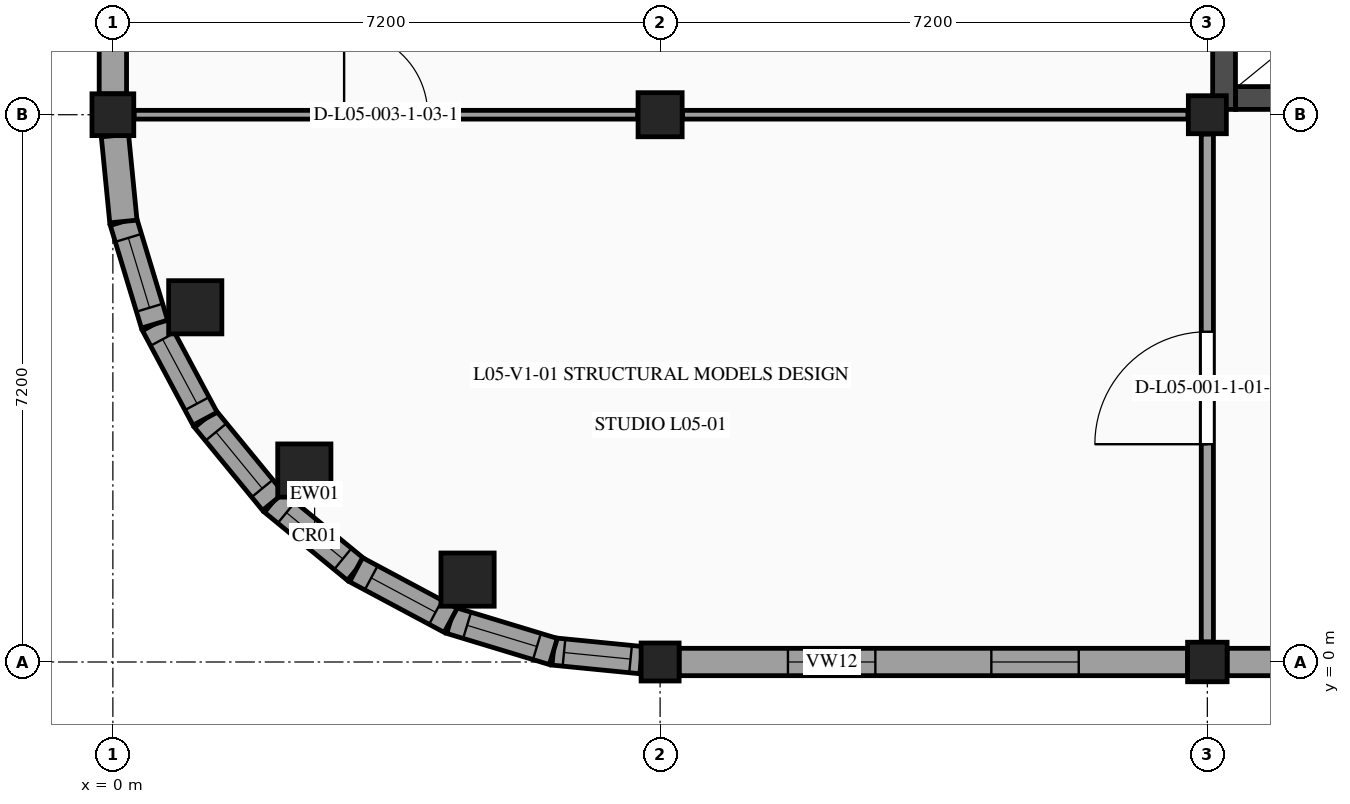
"""IFC4 building model, lengths in metres.
Left out: names, types, materials, properties, quantities, classifications, styles, units other than length and angle.
Written with IfcOpenShell. Run it as: python <this file> out.ifc"""

import sys

from ifc_helpers import new_model, si_unit, direction, frame, frame_2d, origin, origin_2d, place, context, subcontext, project, spatial, rectangle, circle, extrude, element, fill, save


model = new_model("IFC4")
c1 = context("Model", 3, precision=1e-05, world=origin(), true_north=direction((0.0, 1.0)))
c2 = subcontext(c1, "Body", "Model", "MODEL_VIEW")
j1 = project(units=[si_unit("LENGTHUNIT", "METRE"), si_unit("PLANEANGLEUNIT", "RADIAN")], contexts=[c1])
p1 = place(None, origin())
s1 = spatial("IfcSite", under=j1, at=p1, CompositionType="ELEMENT")
p2 = place(p1, origin())
s2 = spatial("IfcBuilding", under=s1, at=p2, CompositionType="ELEMENT")
p3 = place(p2, frame((0.0, 0.0, 22.8)))
s3 = spatial("IfcBuildingStorey", under=s2, at=p3, CompositionType="ELEMENT", Elevation=22.8)
p4 = place(p3, frame((0.0, 7.2, 0.0), z_axis=(0.0, 0.0, 1.0), x_axis=(1.0, 0.0, 0.0)))
e1 = element("IfcColumn", 1, at=p4, inside=s3, PredefinedType="COLUMN", context=c2, shape_type="SweptSolid", body=[
    extrude(rectangle(XDim=0.55, YDim=0.55, at=origin_2d()), origin(), (0.0, 0.0, 1.0), 3.9),
])
p5 = place(p3, frame((7.2, 0.0, 0.0), z_axis=(0.0, 0.0, 1.0), x_axis=(1.0, 0.0, 0.0)))
e2 = element("IfcColumn", 2, at=p5, inside=s3, PredefinedType="COLUMN", context=c2, shape_type="SweptSolid", body=[
    extrude(rectangle(XDim=0.5, YDim=0.5, at=origin_2d()), origin(), (0.0, 0.0, 1.0), 3.9),
])
p6 = place(p3, frame((7.2, 7.2, 0.0), z_axis=(0.0, 0.0, 1.0), x_axis=(1.0, 0.0, 0.0)))
e3 = element("IfcColumn", 3, at=p6, inside=s3, PredefinedType="COLUMN", context=c2, shape_type="SweptSolid", body=[
    extrude(rectangle(XDim=0.58, YDim=0.58, at=origin_2d()), origin(), (0.0, 0.0, 1.0), 3.9),
])
p7 = place(p3, frame((14.4, 0.0, 0.0), z_axis=(0.0, 0.0, 1.0), x_axis=(1.0, 0.0, 0.0)))
e4 = element("IfcColumn", 4, at=p7, inside=s3, PredefinedType="COLUMN", context=c2, shape_type="SweptSolid", body=[
    extrude(rectangle(XDim=0.52, YDim=0.52, at=origin_2d()), origin(), (0.0, 0.0, 1.0), 3.9),
])
p8 = place(p3, frame((14.4, 7.2, 0.0), z_axis=(0.0, 0.0, 1.0), x_axis=(1.0, 0.0, 0.0)))
e5 = element("IfcColumn", 5, at=p8, inside=s3, PredefinedType="COLUMN", context=c2, shape_type="SweptSolid", body=[
    extrude(rectangle(XDim=0.5, YDim=0.5, at=origin_2d()), origin(), (0.0, 0.0, 1.0), 3.9),
])
for number, where, z_axis, x_axis in (
    (6, (1.084, 4.667, 0.0), (0.0, 0.0, 1.0), (1.0, 0.0, 0.0)),
    (7, (2.519, 2.519, 0.0), (0.0, 0.0, 1.0), (1.0, 0.0, 0.0)),
    (8, (4.667, 1.084, 0.0), (0.0, 0.0, 1.0), (1.0, 0.0, 0.0)),
):
    element("IfcColumn", number, at=place(p3, frame(where, z_axis=z_axis, x_axis=x_axis)), inside=s3, PredefinedType="COLUMN", context=c2, shape_type="SweptSolid", body=[
        extrude(circle(Radius=0.35, at=origin_2d()), origin(), (0.0, 0.0, 1.0), 3.9),
    ])
p9 = place(p3, frame((3.2, 1.213, 0.0), z_axis=(0.0, 0.0, 1.0), x_axis=(-0.772977670605, 0.634433227965, 0.0)))
e9 = element("IfcWall", 9, at=p9, inside=s3, PredefinedType="STANDARD", context=c2, shape_type="SweptSolid", body=[
    extrude(rectangle(XDim=1.412, YDim=0.36, at=frame_2d((0.706, 0.0))), origin(), (0.0, 0.0, 1.0), 3.67),
])
p10 = place(p9, frame((0.226, 0.0, 1.0)))
e10 = element("IfcOpeningElement", 10, at=p10, cuts=e9, PredefinedType="OPENING", context=c2, shape_type="SweptSolid", body=[
    extrude(rectangle(XDim=0.96, YDim=1.4, at=frame_2d((0.48, 0.7))), frame((0.0, 0.19, 0.0), z_axis=(0.0, -1.0, 0.0), x_axis=(1.0, 0.0, 0.0)), (0.0, 0.0, 1.0), 0.38),
])
p11 = place(p3, frame((2.109, 2.109, 0.0), z_axis=(0.0, 0.0, 1.0), x_axis=(-0.634433227965, 0.772977670605, 0.0)))
e11 = element("IfcWall", 11, at=p11, inside=s3, PredefinedType="STANDARD", context=c2, shape_type="SweptSolid", body=[
    extrude(rectangle(XDim=1.412, YDim=0.36, at=frame_2d((0.706, 0.0))), origin(), (0.0, 0.0, 1.0), 3.67),
])
p12 = place(p11, frame((0.226, 0.0, 1.0)))
e12 = element("IfcOpeningElement", 12, at=p12, cuts=e11, PredefinedType="OPENING", context=c2, shape_type="SweptSolid", body=[
    extrude(rectangle(XDim=0.96, YDim=1.4, at=frame_2d((0.48, 0.7))), frame((0.0, 0.19, 0.0), z_axis=(0.0, -1.0, 0.0), x_axis=(1.0, 0.0, 0.0)), (0.0, 0.0, 1.0), 0.38),
])
p13 = place(p3, frame((1.213, 3.2, 0.0), z_axis=(0.0, 0.0, 1.0), x_axis=(-0.471405109778, 0.881916788861, 0.0)))
e13 = element("IfcWall", 13, at=p13, inside=s3, PredefinedType="STANDARD", context=c2, shape_type="SweptSolid", body=[
    extrude(rectangle(XDim=1.411, YDim=0.36, at=frame_2d((0.706, 0.0))), origin(), (0.0, 0.0, 1.0), 3.67),
])
p14 = place(p13, frame((0.226, 0.0, 1.0)))
e14 = element("IfcOpeningElement", 14, at=p14, cuts=e13, PredefinedType="OPENING", context=c2, shape_type="SweptSolid", body=[
    extrude(rectangle(XDim=0.96, YDim=1.4, at=frame_2d((0.48, 0.7))), frame((0.0, 0.19, 0.0), z_axis=(0.0, -1.0, 0.0), x_axis=(1.0, 0.0, 0.0)), (0.0, 0.0, 1.0), 0.38),
])
p15 = place(p3, frame((0.548, 4.445, 0.0), z_axis=(0.0, 0.0, 1.0), x_axis=(-0.290218599957, 0.95696037757, 0.0)))
e15 = element("IfcWall", 15, at=p15, inside=s3, PredefinedType="STANDARD", context=c2, shape_type="SweptSolid", body=[
    extrude(rectangle(XDim=1.412, YDim=0.36, at=frame_2d((0.706, 0.0))), origin(), (0.0, 0.0, 1.0), 3.67),
])
p16 = place(p15, frame((0.226, 0.0, 1.0)))
e16 = element("IfcOpeningElement", 16, at=p16, cuts=e15, PredefinedType="OPENING", context=c2, shape_type="SweptSolid", body=[
    extrude(rectangle(XDim=0.96, YDim=1.4, at=frame_2d((0.48, 0.7))), frame((0.0, 0.19, 0.0), z_axis=(0.0, -1.0, 0.0), x_axis=(1.0, 0.0, 0.0)), (0.0, 0.0, 1.0), 0.38),
])
p17 = place(p3, frame((0.138, 5.795, 0.0), z_axis=(0.0, 0.0, 1.0), x_axis=(-0.098184772956, 0.995168202044, 0.0)))
e17 = element("IfcWall", 17, at=p17, inside=s3, PredefinedType="STANDARD", context=c2, shape_type="SweptSolid", body=[
    extrude(rectangle(XDim=1.136, YDim=0.36, at=frame_2d((0.568, 0.0))), origin(), (0.0, 0.0, 1.0), 3.67),
])
p18 = place(p3, frame((0.0, 7.475, 0.0), z_axis=(0.0, 0.0, 1.0), x_axis=(0.0, 1.0, 0.0)))
e18 = element("IfcWall", 18, at=p18, inside=s3, PredefinedType="STANDARD", context=c2, shape_type="SweptSolid", body=[
    extrude(rectangle(XDim=6.665, YDim=0.36, at=frame_2d((3.333, 0.0))), origin(), (0.0, 0.0, 1.0), 2.865),
])
p19 = place(p18, frame((1.324, 0.0, 1.15)))
e19 = element("IfcOpeningElement", 19, at=p19, cuts=e18, PredefinedType="OPENING", context=c2, shape_type="SweptSolid", body=[
    extrude(rectangle(XDim=1.35, YDim=1.1, at=frame_2d((0.675, 0.55))), frame((0.0, 0.19, 0.0), z_axis=(0.0, -1.0, 0.0), x_axis=(1.0, 0.0, 0.0)), (0.0, 0.0, 1.0), 0.38),
])
p20 = place(p18, frame((3.99, 0.0, 1.15)))
e20 = element("IfcOpeningElement", 20, at=p20, cuts=e18, PredefinedType="OPENING", context=c2, shape_type="SweptSolid", body=[
    extrude(rectangle(XDim=1.35, YDim=1.1, at=frame_2d((0.675, 0.55))), frame((0.0, 0.19, 0.0), z_axis=(0.0, -1.0, 0.0), x_axis=(1.0, 0.0, 0.0)), (0.0, 0.0, 1.0), 0.38),
])
p21 = place(p3, frame((21.325, 0.0, 0.0), z_axis=(0.0, 0.0, 1.0), x_axis=(-1.0, 0.0, 0.0)))
e21 = element("IfcWall", 21, at=p21, inside=s3, PredefinedType="STANDARD", context=c2, shape_type="SweptSolid", body=[
    extrude(rectangle(XDim=6.665, YDim=0.36, at=frame_2d((3.333, 0.0))), origin(), (0.0, 0.0, 1.0), 2.865),
])
p22 = place(p21, frame((1.375, 0.0, 1.15)))
e22 = element("IfcOpeningElement", 22, at=p22, cuts=e21, PredefinedType="OPENING", context=c2, shape_type="SweptSolid", body=[
    extrude(rectangle(XDim=1.25, YDim=1.25, at=frame_2d((0.625, 0.625))), frame((0.0, 0.19, 0.0), z_axis=(0.0, -1.0, 0.0), x_axis=(1.0, 0.0, 0.0)), (0.0, 0.0, 1.0), 0.38),
])
p23 = place(p21, frame((4.041, 0.0, 1.15)))
e23 = element("IfcOpeningElement", 23, at=p23, cuts=e21, PredefinedType="OPENING", context=c2, shape_type="SweptSolid", body=[
    extrude(rectangle(XDim=1.25, YDim=1.25, at=frame_2d((0.625, 0.625))), frame((0.0, 0.19, 0.0), z_axis=(0.0, -1.0, 0.0), x_axis=(1.0, 0.0, 0.0)), (0.0, 0.0, 1.0), 0.38),
])
p24 = place(p3, frame((14.14, 0.0, 0.0), z_axis=(0.0, 0.0, 1.0), x_axis=(-1.0, 0.0, 0.0)))
e24 = element("IfcWall", 24, at=p24, inside=s3, PredefinedType="STANDARD", context=c2, shape_type="SweptSolid", body=[
    extrude(rectangle(XDim=6.69, YDim=0.36, at=frame_2d((3.345, 0.0))), origin(), (0.0, 0.0, 1.0), 2.865),
])
p25 = place(p24, frame((1.432, 0.0, 1.15)))
e25 = element("IfcOpeningElement", 25, at=p25, cuts=e24, PredefinedType="OPENING", context=c2, shape_type="SweptSolid", body=[
    extrude(rectangle(XDim=1.15, YDim=1.2, at=frame_2d((0.575, 0.6))), frame((0.0, 0.19, 0.0), z_axis=(0.0, -1.0, 0.0), x_axis=(1.0, 0.0, 0.0)), (0.0, 0.0, 1.0), 0.38),
])
p26 = place(p24, frame((4.108, 0.0, 1.15)))
e26 = element("IfcOpeningElement", 26, at=p26, cuts=e24, PredefinedType="OPENING", context=c2, shape_type="SweptSolid", body=[
    extrude(rectangle(XDim=1.15, YDim=1.2, at=frame_2d((0.575, 0.6))), frame((0.0, 0.19, 0.0), z_axis=(0.0, -1.0, 0.0), x_axis=(1.0, 0.0, 0.0)), (0.0, 0.0, 1.0), 0.38),
])
p27 = place(p3, frame((6.951, 0.024, 0.0), z_axis=(0.0, 0.0, 1.0), x_axis=(-0.995169505688, 0.098171558757, 0.0)))
e27 = element("IfcWall", 27, at=p27, inside=s3, PredefinedType="STANDARD", context=c2, shape_type="SweptSolid", body=[
    extrude(rectangle(XDim=1.161, YDim=0.36, at=frame_2d((0.581, 0.0))), origin(), (0.0, 0.0, 1.0), 3.67),
])
p28 = place(p27, frame((0.141, 0.0, 1.0)))
e28 = element("IfcOpeningElement", 28, at=p28, cuts=e27, PredefinedType="OPENING", context=c2, shape_type="SweptSolid", body=[
    extrude(rectangle(XDim=0.88, YDim=1.3, at=frame_2d((0.44, 0.65))), frame((0.0, 0.19, 0.0), z_axis=(0.0, -1.0, 0.0), x_axis=(1.0, 0.0, 0.0)), (0.0, 0.0, 1.0), 0.38),
])
p29 = place(p3, frame((5.795, 0.138, 0.0), z_axis=(0.0, 0.0, 1.0), x_axis=(-0.95696037757, 0.290218599957, 0.0)))
e29 = element("IfcWall", 29, at=p29, inside=s3, PredefinedType="STANDARD", context=c2, shape_type="SweptSolid", body=[
    extrude(rectangle(XDim=1.412, YDim=0.36, at=frame_2d((0.706, 0.0))), origin(), (0.0, 0.0, 1.0), 3.67),
])
p30 = place(p29, frame((0.226, 0.0, 1.0)))
e30 = element("IfcOpeningElement", 30, at=p30, cuts=e29, PredefinedType="OPENING", context=c2, shape_type="SweptSolid", body=[
    extrude(rectangle(XDim=0.96, YDim=1.4, at=frame_2d((0.48, 0.7))), frame((0.0, 0.19, 0.0), z_axis=(0.0, -1.0, 0.0), x_axis=(1.0, 0.0, 0.0)), (0.0, 0.0, 1.0), 0.38),
])
p31 = place(p3, frame((4.445, 0.548, 0.0), z_axis=(0.0, 0.0, 1.0), x_axis=(-0.881916788861, 0.471405109778, 0.0)))
e31 = element("IfcWall", 31, at=p31, inside=s3, PredefinedType="STANDARD", context=c2, shape_type="SweptSolid", body=[
    extrude(rectangle(XDim=1.411, YDim=0.36, at=frame_2d((0.706, 0.0))), origin(), (0.0, 0.0, 1.0), 3.67),
])
p32 = place(p31, frame((0.226, 0.0, 1.0)))
e32 = element("IfcOpeningElement", 32, at=p32, cuts=e31, PredefinedType="OPENING", context=c2, shape_type="SweptSolid", body=[
    extrude(rectangle(XDim=0.96, YDim=1.4, at=frame_2d((0.48, 0.7))), frame((0.0, 0.19, 0.0), z_axis=(0.0, -1.0, 0.0), x_axis=(1.0, 0.0, 0.0)), (0.0, 0.0, 1.0), 0.38),
])
p33 = place(p3, frame((14.77, 7.42, 0.0), z_axis=(0.0, 0.0, 1.0), x_axis=(1.0, 0.0, 0.0)))
e33 = element("IfcWall", 33, at=p33, inside=s3, PredefinedType="SHEAR", context=c2, shape_type="SweptSolid", body=[
    extrude(rectangle(XDim=6.68, YDim=0.3, at=frame_2d((3.34, 0.0))), origin(), (0.0, 0.0, 1.0), 3.67),
])
p34 = place(p3, frame((14.62, 14.33, 0.0), z_axis=(0.0, 0.0, 1.0), x_axis=(0.0, -1.0, 0.0)))
e34 = element("IfcWall", 34, at=p34, inside=s3, PredefinedType="SHEAR", context=c2, shape_type="SweptSolid", body=[
    extrude(rectangle(XDim=7.06, YDim=0.3, at=frame_2d((3.53, 0.0))), origin(), (0.0, 0.0, 1.0), 3.67),
])
p35 = place(p3, frame((0.28, 7.2, 0.0), z_axis=(0.0, 0.0, 1.0), x_axis=(1.0, 0.0, 0.0)))
e35 = element("IfcWall", 35, at=p35, inside=s3, PredefinedType="PARTITIONING", context=c2, shape_type="SweptSolid", body=[
    extrude(rectangle(XDim=6.625, YDim=0.115, at=frame_2d((3.312, 0.0))), origin(), (0.0, 0.0, 1.0), 2.97),
])
p36 = place(p35, frame((2.762, 0.0, 0.0)))
e36 = element("IfcOpeningElement", 36, at=p36, cuts=e35, PredefinedType="OPENING", context=c2, shape_type="SweptSolid", body=[
    extrude(rectangle(XDim=1.1, YDim=2.15, at=frame_2d((0.55, 1.075))), frame((0.0, 0.067, 0.0), z_axis=(0.0, -1.0, 0.0), x_axis=(1.0, 0.0, 0.0)), (0.0, 0.0, 1.0), 0.135),
])
p37 = place(p3, frame((14.4, 0.265, 0.0), z_axis=(0.0, 0.0, 1.0), x_axis=(0.0, 1.0, 0.0)))
e37 = element("IfcWall", 37, at=p37, inside=s3, PredefinedType="PARTITIONING", context=c2, shape_type="SweptSolid", body=[
    extrude(rectangle(XDim=6.68, YDim=0.16, at=frame_2d((3.34, 0.0))), origin(), (0.0, 0.0, 1.0), 2.975),
])
p38 = place(p37, frame((2.6, 0.0, 0.0)))
e38 = element("IfcOpeningElement", 38, at=p38, cuts=e37, PredefinedType="OPENING", context=c2, shape_type="SweptSolid", body=[
    extrude(rectangle(XDim=1.48, YDim=2.28, at=frame_2d((0.74, 1.14))), frame((0.0, 0.09, 0.0), z_axis=(0.0, -1.0, 0.0), x_axis=(1.0, 0.0, 0.0)), (0.0, 0.0, 1.0), 0.18),
])
p39 = place(p3, frame((7.495, 7.2, 0.0), z_axis=(0.0, 0.0, 1.0), x_axis=(1.0, 0.0, 0.0)))
e39 = element("IfcWall", 39, at=p39, inside=s3, PredefinedType="PARTITIONING", context=c2, shape_type="SweptSolid", body=[
    extrude(rectangle(XDim=6.65, YDim=0.115, at=frame_2d((3.325, 0.0))), origin(), (0.0, 0.0, 1.0), 3.01),
])
p40 = place(p10, origin())
e40 = element("IfcWindow", 40, at=p40, inside=s3, PartitioningType="SINGLE_PANEL", PredefinedType="WINDOW", context=c2, shape_type="SweptSolid", body=[
    extrude(rectangle(XDim=0.96, YDim=1.4, at=frame_2d((0.48, 0.7))), frame((0.0, -0.01, 0.0), z_axis=(0.0, -1.0, 0.0), x_axis=(1.0, 0.0, 0.0)), (0.0, 0.0, 1.0), 0.06),
])
fill(e10, e40)
p41 = place(p12, origin())
e41 = element("IfcWindow", 41, at=p41, inside=s3, PartitioningType="SINGLE_PANEL", PredefinedType="WINDOW", context=c2, shape_type="SweptSolid", body=[
    extrude(rectangle(XDim=0.96, YDim=1.4, at=frame_2d((0.48, 0.7))), frame((0.0, -0.01, 0.0), z_axis=(0.0, -1.0, 0.0), x_axis=(1.0, 0.0, 0.0)), (0.0, 0.0, 1.0), 0.06),
])
fill(e12, e41)
p42 = place(p14, origin())
e42 = element("IfcWindow", 42, at=p42, inside=s3, PartitioningType="SINGLE_PANEL", PredefinedType="WINDOW", context=c2, shape_type="SweptSolid", body=[
    extrude(rectangle(XDim=0.96, YDim=1.4, at=frame_2d((0.48, 0.7))), frame((0.0, -0.01, 0.0), z_axis=(0.0, -1.0, 0.0), x_axis=(1.0, 0.0, 0.0)), (0.0, 0.0, 1.0), 0.06),
])
fill(e14, e42)
p43 = place(p16, origin())
e43 = element("IfcWindow", 43, at=p43, inside=s3, PartitioningType="SINGLE_PANEL", PredefinedType="WINDOW", context=c2, shape_type="SweptSolid", body=[
    extrude(rectangle(XDim=0.96, YDim=1.4, at=frame_2d((0.48, 0.7))), frame((0.0, -0.01, 0.0), z_axis=(0.0, -1.0, 0.0), x_axis=(1.0, 0.0, 0.0)), (0.0, 0.0, 1.0), 0.06),
])
fill(e16, e43)
p44 = place(p25, origin())
e44 = element("IfcWindow", 44, at=p44, inside=s3, PartitioningType="SINGLE_PANEL", PredefinedType="WINDOW", context=c2, shape_type="SweptSolid", body=[
    extrude(rectangle(XDim=1.15, YDim=1.2, at=frame_2d((0.575, 0.6))), frame((0.0, -0.08, 0.0), z_axis=(0.0, -1.0, 0.0), x_axis=(1.0, 0.0, 0.0)), (0.0, 0.0, 1.0), 0.06),
])
fill(e25, e44)
p45 = place(p26, origin())
e45 = element("IfcWindow", 45, at=p45, inside=s3, PartitioningType="SINGLE_PANEL", PredefinedType="WINDOW", context=c2, shape_type="SweptSolid", body=[
    extrude(rectangle(XDim=1.15, YDim=1.2, at=frame_2d((0.575, 0.6))), frame((0.0, -0.08, 0.0), z_axis=(0.0, -1.0, 0.0), x_axis=(1.0, 0.0, 0.0)), (0.0, 0.0, 1.0), 0.06),
])
fill(e26, e45)
p46 = place(p28, origin())
e46 = element("IfcWindow", 46, at=p46, inside=s3, PartitioningType="SINGLE_PANEL", PredefinedType="WINDOW", context=c2, shape_type="SweptSolid", body=[
    extrude(rectangle(XDim=0.88, YDim=1.3, at=frame_2d((0.44, 0.65))), frame((0.0, -0.01, 0.0), z_axis=(0.0, -1.0, 0.0), x_axis=(1.0, 0.0, 0.0)), (0.0, 0.0, 1.0), 0.06),
])
fill(e28, e46)
p47 = place(p30, origin())
e47 = element("IfcWindow", 47, at=p47, inside=s3, PartitioningType="SINGLE_PANEL", PredefinedType="WINDOW", context=c2, shape_type="SweptSolid", body=[
    extrude(rectangle(XDim=0.96, YDim=1.4, at=frame_2d((0.48, 0.7))), frame((0.0, -0.01, 0.0), z_axis=(0.0, -1.0, 0.0), x_axis=(1.0, 0.0, 0.0)), (0.0, 0.0, 1.0), 0.06),
])
fill(e30, e47)
p48 = place(p32, origin())
e48 = element("IfcWindow", 48, at=p48, inside=s3, PartitioningType="SINGLE_PANEL", PredefinedType="WINDOW", context=c2, shape_type="SweptSolid", body=[
    extrude(rectangle(XDim=0.96, YDim=1.4, at=frame_2d((0.48, 0.7))), frame((0.0, -0.01, 0.0), z_axis=(0.0, -1.0, 0.0), x_axis=(1.0, 0.0, 0.0)), (0.0, 0.0, 1.0), 0.06),
])
fill(e32, e48)
p49 = place(p38, origin())
e49 = element("IfcDoor", 49, at=p49, inside=s3, OperationType="SINGLE_SWING_LEFT", PredefinedType="DOOR", context=c2, shape_type="SweptSolid", body=[
    extrude(rectangle(XDim=1.48, YDim=2.28, at=frame_2d((0.74, 1.14))), frame((0.0, 0.025, 0.0), z_axis=(0.0, -1.0, 0.0), x_axis=(1.0, 0.0, 0.0)), (0.0, 0.0, 1.0), 0.05),
])
fill(e38, e49)
p50 = place(p36, origin())
e50 = element("IfcDoor", 50, at=p50, inside=s3, OperationType="SINGLE_SWING_LEFT", PredefinedType="DOOR", context=c2, shape_type="SweptSolid", body=[
    extrude(rectangle(XDim=1.1, YDim=2.15, at=frame_2d((0.55, 1.075))), frame((0.0, 0.025, 0.0), z_axis=(0.0, -1.0, 0.0), x_axis=(1.0, 0.0, 0.0)), (0.0, 0.0, 1.0), 0.05),
])
fill(e36, e50)
save(model, sys.argv[1])
